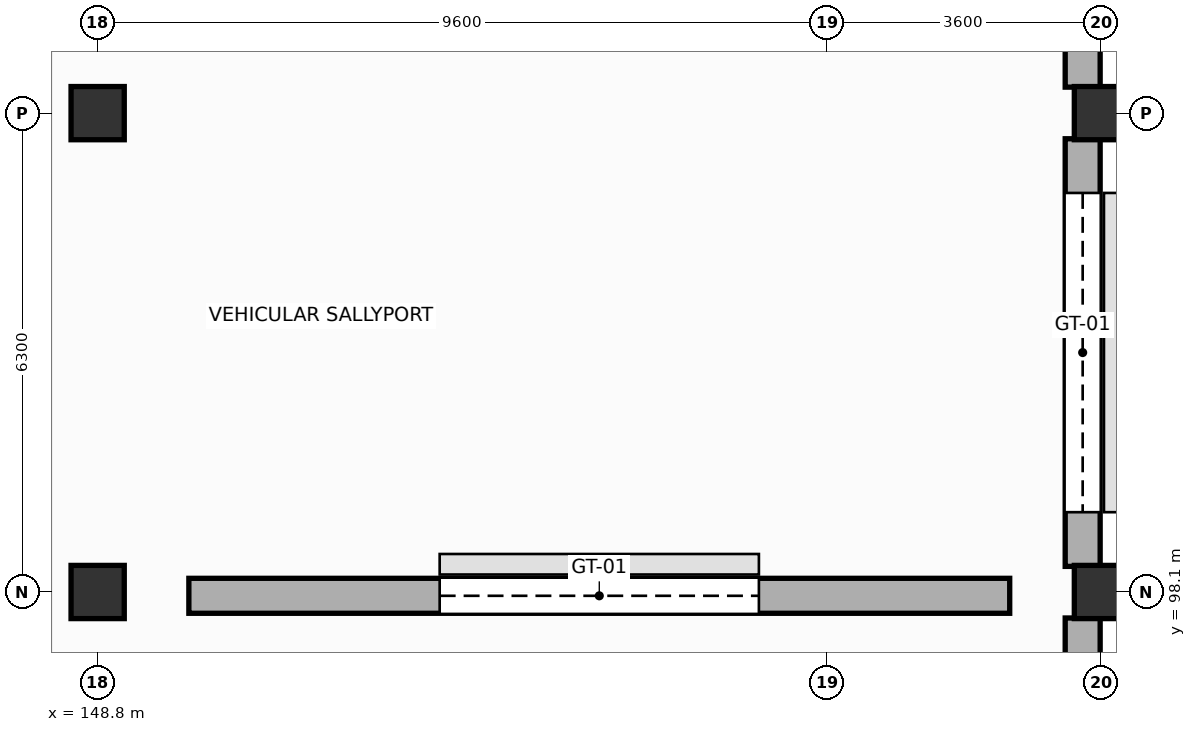
"""IFC4 building model, lengths in metres.
Left out: names, types, materials, properties, quantities, classifications, styles, units other than length and angle.
Written with IfcOpenShell. Run it as: python <this file> out.ifc"""

import sys

from ifc_helpers import new_model, si_unit, direction, frame, frame_2d, origin, origin_2d, place, context, subcontext, project, spatial, rectangle, extrude, element, fill, save


model = new_model("IFC4")
c1 = context("Model", 3, precision=1e-05, world=origin(), true_north=direction((0.0, 1.0)))
c2 = subcontext(c1, "Body", "Model", "MODEL_VIEW")
j1 = project(units=[si_unit("LENGTHUNIT", "METRE"), si_unit("PLANEANGLEUNIT", "RADIAN")], contexts=[c1])
p1 = place(None, origin())
s1 = spatial("IfcSite", under=j1, at=p1, CompositionType="ELEMENT")
p2 = place(p1, origin())
s2 = spatial("IfcBuilding", under=s1, at=p2, CompositionType="ELEMENT")
p3 = place(p2, origin())
s3 = spatial("IfcBuildingStorey", under=s2, at=p3, CompositionType="ELEMENT", Elevation=0.0)
for number, where, z_axis, x_axis in (
    (1, (148.8, 98.1, 0.0), (0.0, 0.0, 1.0), (1.0, 0.0, 0.0)),
    (2, (148.8, 104.4, 0.0), (0.0, 0.0, 1.0), (1.0, 0.0, 0.0)),
    (3, (162.0, 98.1, 0.0), (0.0, 0.0, 1.0), (1.0, 0.0, 0.0)),
    (4, (162.0, 104.4, 0.0), (0.0, 0.0, 1.0), (1.0, 0.0, 0.0)),
):
    element("IfcColumn", number, at=place(p3, frame(where, z_axis=z_axis, x_axis=x_axis)), inside=s3, PredefinedType="COLUMN", context=c2, shape_type="SweptSolid", body=[
        extrude(rectangle(XDim=0.7, YDim=0.7, at=origin_2d()), origin(), (0.0, 0.0, 1.0), 5.4),
    ])
p4 = place(p3, frame((161.76, 97.758, 0.0), z_axis=(0.0, 0.0, 1.0), x_axis=(0.0, -1.0, 0.0)))
e5 = element("IfcWall", 5, at=p4, inside=s3, PredefinedType="STANDARD", context=c2, shape_type="SweptSolid", body=[
    extrude(rectangle(XDim=11.921, YDim=0.46, at=frame_2d((5.96, 0.0))), origin(), (0.0, 0.0, 1.0), 4.27),
])
p5 = place(p4, frame((9.558, 0.0, 0.0)))
e6 = element("IfcOpeningElement", 6, at=p5, cuts=e5, PredefinedType="OPENING", context=c2, shape_type="SweptSolid", body=[
    extrude(rectangle(XDim=1.8, YDim=2.25, at=frame_2d((0.9, 1.125))), frame((0.0, 0.24, 0.0), z_axis=(0.0, -1.0, 0.0), x_axis=(1.0, 0.0, 0.0)), (0.0, 0.0, 1.0), 0.48),
])
p6 = place(p3, frame((161.76, 104.063, 0.0), z_axis=(0.0, 0.0, 1.0), x_axis=(0.0, -1.0, 0.0)))
e7 = element("IfcWall", 7, at=p6, inside=s3, PredefinedType="STANDARD", context=c2, shape_type="SweptSolid", body=[
    extrude(rectangle(XDim=5.626, YDim=0.46, at=frame_2d((2.813, 0.0))), origin(), (0.0, 0.0, 1.0), 4.27),
])
p7 = place(p6, frame((0.713, 0.0, 0.0)))
e8 = element("IfcOpeningElement", 8, at=p7, cuts=e7, PredefinedType="OPENING", context=c2, shape_type="SweptSolid", body=[
    extrude(rectangle(XDim=4.2, YDim=3.6, at=frame_2d((2.1, 1.8))), frame((0.0, 0.24, 0.0), z_axis=(0.0, -1.0, 0.0), x_axis=(1.0, 0.0, 0.0)), (0.0, 0.0, 1.0), 0.48),
])
p8 = place(p3, frame((161.76, 112.32, 0.0), z_axis=(0.0, 0.0, 1.0), x_axis=(0.0, -1.0, 0.0)))
e9 = element("IfcWall", 9, at=p8, inside=s3, PredefinedType="STANDARD", context=c2, shape_type="SweptSolid", body=[
    extrude(rectangle(XDim=7.578, YDim=0.46, at=frame_2d((3.789, 0.0))), origin(), (0.0, 0.0, 1.0), 4.57),
])
p9 = place(p8, frame((1.71, 0.0, 2.15)))
e10 = element("IfcOpeningElement", 10, at=p9, cuts=e9, PredefinedType="OPENING", context=c2, shape_type="SweptSolid", body=[
    extrude(rectangle(XDim=0.85, YDim=0.9, at=frame_2d((0.425, 0.45))), frame((0.0, 0.24, 0.0), z_axis=(0.0, -1.0, 0.0), x_axis=(1.0, 0.0, 0.0)), (0.0, 0.0, 1.0), 0.48),
])
p10 = place(p8, frame((4.88, 0.0, 2.15)))
e11 = element("IfcOpeningElement", 11, at=p10, cuts=e9, PredefinedType="OPENING", context=c2, shape_type="SweptSolid", body=[
    extrude(rectangle(XDim=0.85, YDim=0.9, at=frame_2d((0.425, 0.45))), frame((0.0, 0.24, 0.0), z_axis=(0.0, -1.0, 0.0), x_axis=(1.0, 0.0, 0.0)), (0.0, 0.0, 1.0), 0.48),
])
p11 = place(p3, frame((150.0, 98.05, 0.0), z_axis=(0.0, 0.0, 1.0), x_axis=(1.0, 0.0, 0.0)))
e12 = element("IfcWall", 12, at=p11, inside=s3, PredefinedType="STANDARD", context=c2, shape_type="SweptSolid", body=[
    extrude(rectangle(XDim=10.8, YDim=0.46, at=frame_2d((5.4, 0.0))), origin(), (0.0, 0.0, 1.0), 4.1),
])
p12 = place(p11, frame((3.3, 0.0, 0.0)))
e13 = element("IfcOpeningElement", 13, at=p12, cuts=e12, PredefinedType="OPENING", context=c2, shape_type="SweptSolid", body=[
    extrude(rectangle(XDim=4.2, YDim=3.6, at=frame_2d((2.1, 1.8))), frame((0.0, 0.24, 0.0), z_axis=(0.0, -1.0, 0.0), x_axis=(1.0, 0.0, 0.0)), (0.0, 0.0, 1.0), 0.48),
])
p13 = place(p7, origin())
e14 = element("IfcDoor", 14, at=p13, inside=s3, OperationType="ROLLINGUP", PredefinedType="GATE", context=c2, shape_type="SweptSolid", body=[
    extrude(rectangle(XDim=4.2, YDim=3.6, at=frame_2d((2.1, 1.8))), frame((0.0, 0.025, 0.0), z_axis=(0.0, -1.0, 0.0), x_axis=(1.0, 0.0, 0.0)), (0.0, 0.0, 1.0), 0.05),
])
fill(e8, e14)
p14 = place(p12, origin())
e15 = element("IfcDoor", 15, at=p14, inside=s3, OperationType="ROLLINGUP", PredefinedType="GATE", context=c2, shape_type="SweptSolid", body=[
    extrude(rectangle(XDim=4.2, YDim=3.6, at=frame_2d((2.1, 1.8))), frame((0.0, 0.025, 0.0), z_axis=(0.0, -1.0, 0.0), x_axis=(1.0, 0.0, 0.0)), (0.0, 0.0, 1.0), 0.05),
])
fill(e13, e15)
save(model, sys.argv[1])
